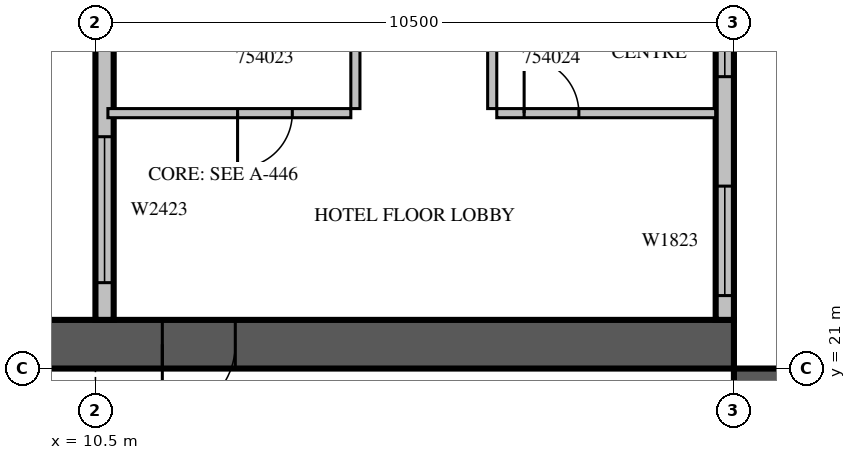
"""IFC4 building model, lengths in metres.
Left out: names, types, materials, properties, quantities, classifications, styles, units other than length and angle.
Written with IfcOpenShell. Run it as: python <this file> out.ifc"""

import sys

from ifc_helpers import new_model, si_unit, direction, frame, frame_2d, origin, place, context, subcontext, project, spatial, rectangle, extrude, source, transform, mapped, element, fill, save


model = new_model("IFC4")
c1 = context("Model", 3, precision=1e-05, world=origin(), true_north=direction((0.0, 1.0)))
c2 = subcontext(c1, "Body", "Model", "MODEL_VIEW")
j1 = project(units=[si_unit("LENGTHUNIT", "METRE"), si_unit("PLANEANGLEUNIT", "RADIAN")], contexts=[c1])
p1 = place(None, origin())
s1 = spatial("IfcSite", under=j1, at=p1, CompositionType="ELEMENT")
p2 = place(p1, origin())
s2 = spatial("IfcBuilding", under=s1, at=p2, CompositionType="ELEMENT")
p3 = place(p2, frame((0.0, 0.0, 238.6)))
s3 = spatial("IfcBuildingStorey", under=s2, at=p3, CompositionType="ELEMENT", Elevation=238.6)
m1 = source(origin(), c2, "Body", "SweptSolid", [
    extrude(rectangle(XDim=16.8, YDim=0.8, at=frame_2d((8.4, 0.0))), origin(), (0.0, 0.0, 1.0), 3.8),
])
p4 = place(p3, frame((21.4, 4.2, 0.0), z_axis=(0.0, 0.0, 1.0), x_axis=(0.0, 1.0, 0.0)))
e1 = element("IfcWall", 1, at=p4, inside=s3, PredefinedType="SHEAR", context=c2, shape_type="MappedRepresentation", body=[
    mapped(m1, transform((0.0, 0.0, 0.0), scale=1.0)),
])
m2 = source(origin(), c2, "Body", "SweptSolid", [
    extrude(rectangle(XDim=2.2, YDim=2.1, at=frame_2d((1.1, 1.05))), frame((0.0, 0.41, 0.0), z_axis=(0.0, -1.0, 0.0), x_axis=(1.0, 0.0, 0.0)), (0.0, 0.0, 1.0), 0.82),
])
p5 = place(p4, frame((4.2, 0.0, 0.0)))
e2 = element("IfcOpeningElement", 2, at=p5, cuts=e1, PredefinedType="OPENING", context=c2, shape_type="MappedRepresentation", body=[
    mapped(m2, transform((0.0, 0.0, 0.0), scale=1.0)),
])
m3 = source(origin(), c2, "Body", "SweptSolid", [
    extrude(rectangle(XDim=1.2, YDim=2.1, at=frame_2d((0.6, 1.05))), frame((0.0, 0.41, 0.0), z_axis=(0.0, -1.0, 0.0), x_axis=(1.0, 0.0, 0.0)), (0.0, 0.0, 1.0), 0.82),
])
p6 = place(p4, frame((14.7, 0.0, 0.0)))
e3 = element("IfcOpeningElement", 3, at=p6, cuts=e1, PredefinedType="OPENING", context=c2, shape_type="MappedRepresentation", body=[
    mapped(m3, transform((0.0, 0.0, 0.0), scale=1.0)),
])
p7 = place(p3, frame((4.2, 21.4, 0.0), z_axis=(0.0, 0.0, 1.0), x_axis=(1.0, 0.0, 0.0)))
e4 = element("IfcWall", 4, at=p7, inside=s3, PredefinedType="SHEAR", context=c2, shape_type="MappedRepresentation", body=[
    mapped(m1, transform((0.0, 0.0, 0.0), scale=1.0)),
])
p8 = place(p7, frame((7.4, 0.0, 0.0)))
e5 = element("IfcOpeningElement", 5, at=p8, cuts=e4, PredefinedType="OPENING", context=c2, shape_type="MappedRepresentation", body=[
    mapped(m3, transform((0.0, 0.0, 0.0), scale=1.0)),
])
m4 = source(origin(), c2, "Body", "SweptSolid", [
    extrude(rectangle(XDim=7.2, YDim=0.3, at=frame_2d((3.6, 0.0))), origin(), (0.0, 0.0, 1.0), 3.4),
])
p9 = place(p3, frame((20.85, 21.8, 0.0), z_axis=(0.0, 0.0, 1.0), x_axis=(0.0, 1.0, 0.0)))
e6 = element("IfcWall", 6, at=p9, inside=s3, PredefinedType="STANDARD", context=c2, shape_type="MappedRepresentation", body=[
    mapped(m4, transform((0.0, 0.0, 0.0), scale=1.0)),
])
m5 = source(origin(), c2, "Body", "SweptSolid", [
    extrude(rectangle(XDim=1.8, YDim=2.3, at=frame_2d((0.9, 1.15))), frame((0.0, 0.16, 0.0), z_axis=(0.0, -1.0, 0.0), x_axis=(1.0, 0.0, 0.0)), (0.0, 0.0, 1.0), 0.32),
])
p10 = place(p9, frame((0.4, 0.0, 0.6)))
e7 = element("IfcOpeningElement", 7, at=p10, cuts=e6, PredefinedType="OPENING", context=c2, shape_type="MappedRepresentation", body=[
    mapped(m5, transform((0.0, 0.0, 0.0), scale=1.0)),
])
m6 = source(origin(), c2, "Body", "SweptSolid", [
    extrude(rectangle(XDim=3.0, YDim=2.3, at=frame_2d((1.5, 1.15))), frame((0.0, 0.16, 0.0), z_axis=(0.0, -1.0, 0.0), x_axis=(1.0, 0.0, 0.0)), (0.0, 0.0, 1.0), 0.32),
])
p11 = place(p9, frame((4.0, 0.0, 0.6)))
e8 = element("IfcOpeningElement", 8, at=p11, cuts=e6, PredefinedType="OPENING", context=c2, shape_type="MappedRepresentation", body=[
    mapped(m6, transform((0.0, 0.0, 0.0), scale=1.0)),
])
p12 = place(p3, frame((10.65, 29.0, 0.0), z_axis=(0.0, 0.0, 1.0), x_axis=(0.0, -1.0, 0.0)))
e9 = element("IfcWall", 9, at=p12, inside=s3, PredefinedType="STANDARD", context=c2, shape_type="MappedRepresentation", body=[
    mapped(m4, transform((0.0, 0.0, 0.0), scale=1.0)),
])
p13 = place(p12, frame((0.2, 0.0, 0.6)))
e10 = element("IfcOpeningElement", 10, at=p13, cuts=e9, PredefinedType="OPENING", context=c2, shape_type="MappedRepresentation", body=[
    mapped(m5, transform((0.0, 0.0, 0.0), scale=1.0)),
])
m7 = source(origin(), c2, "Body", "SweptSolid", [
    extrude(rectangle(XDim=2.4, YDim=2.3, at=frame_2d((1.2, 1.15))), frame((0.0, 0.16, 0.0), z_axis=(0.0, -1.0, 0.0), x_axis=(1.0, 0.0, 0.0)), (0.0, 0.0, 1.0), 0.32),
])
p14 = place(p12, frame((4.188, 0.0, 0.6)))
e11 = element("IfcOpeningElement", 11, at=p14, cuts=e9, PredefinedType="OPENING", context=c2, shape_type="MappedRepresentation", body=[
    mapped(m7, transform((0.0, 0.0, 0.0), scale=1.0)),
])
m8 = source(origin(), c2, "Body", "SweptSolid", [
    extrude(rectangle(XDim=3.995, YDim=0.15, at=frame_2d((1.998, 0.0))), origin(), (0.0, 0.0, 1.0), 3.4),
])
p15 = place(p3, frame((10.705, 25.2, 0.0), z_axis=(0.0, 0.0, 1.0), x_axis=(1.0, 0.0, 0.0)))
e12 = element("IfcWall", 12, at=p15, inside=s3, PredefinedType="PARTITIONING", context=c2, shape_type="MappedRepresentation", body=[
    mapped(m8, transform((0.0, 0.0, 0.0), scale=1.0)),
])
m9 = source(origin(), c2, "Body", "SweptSolid", [
    extrude(rectangle(XDim=0.9, YDim=2.1, at=frame_2d((0.45, 1.05))), frame((0.0, 0.085, 0.0), z_axis=(0.0, -1.0, 0.0), x_axis=(1.0, 0.0, 0.0)), (0.0, 0.0, 1.0), 0.17),
])
p16 = place(p15, frame((2.132, 0.0, 0.0)))
e13 = element("IfcOpeningElement", 13, at=p16, cuts=e12, PredefinedType="OPENING", context=c2, shape_type="MappedRepresentation", body=[
    mapped(m9, transform((0.0, 0.0, 0.0), scale=1.0)),
])
m10 = source(origin(), c2, "Body", "SweptSolid", [
    extrude(rectangle(XDim=3.6, YDim=0.15, at=frame_2d((1.8, 0.0))), origin(), (0.0, 0.0, 1.0), 3.4),
])
p17 = place(p3, frame((17.1, 25.2, 0.0), z_axis=(0.0, 0.0, 1.0), x_axis=(1.0, 0.0, 0.0)))
e14 = element("IfcWall", 14, at=p17, inside=s3, PredefinedType="PARTITIONING", context=c2, shape_type="MappedRepresentation", body=[
    mapped(m10, transform((0.0, 0.0, 0.0), scale=1.0)),
])
p18 = place(p17, frame((0.45, 0.0, 0.0)))
e15 = element("IfcOpeningElement", 15, at=p18, cuts=e14, PredefinedType="OPENING", context=c2, shape_type="MappedRepresentation", body=[
    mapped(m9, transform((0.0, 0.0, 0.0), scale=1.0)),
])
m11 = source(origin(), c2, "Body", "SweptSolid", [
    extrude(rectangle(XDim=4.05, YDim=0.15, at=frame_2d((2.025, 0.0))), origin(), (0.0, 0.0, 1.0), 3.4),
])
for number, where, z_axis, x_axis in (
    (16, (14.775, 25.275, 0.0), (0.0, 0.0, 1.0), (0.0, 1.0, 0.0)),
    (17, (17.025, 29.325, 0.0), (0.0, 0.0, 1.0), (0.0, -1.0, 0.0)),
):
    element("IfcWall", number, at=place(p3, frame(where, z_axis=z_axis, x_axis=x_axis)), inside=s3, PredefinedType="PARTITIONING", context=c2, shape_type="MappedRepresentation", body=[
        mapped(m11, transform((0.0, 0.0, 0.0), scale=1.0)),
    ])
m12 = source(origin(), c2, "Body", "SweptSolid", [
    extrude(rectangle(XDim=1.8, YDim=2.3, at=frame_2d((0.9, 1.15))), frame((0.0, 0.03, 0.0), z_axis=(0.0, -1.0, 0.0), x_axis=(1.0, 0.0, 0.0)), (0.0, 0.0, 1.0), 0.06),
])
p19 = place(p10, origin())
e18 = element("IfcWindow", 18, at=p19, inside=s3, PartitioningType="SINGLE_PANEL", PredefinedType="WINDOW", context=c2, shape_type="MappedRepresentation", body=[
    mapped(m12, transform((0.0, 0.0, 0.0), scale=1.0)),
])
fill(e7, e18)
m13 = source(origin(), c2, "Body", "SweptSolid", [
    extrude(rectangle(XDim=3.0, YDim=2.3, at=frame_2d((1.5, 1.15))), frame((0.0, 0.03, 0.0), z_axis=(0.0, -1.0, 0.0), x_axis=(1.0, 0.0, 0.0)), (0.0, 0.0, 1.0), 0.06),
])
p20 = place(p11, origin())
e19 = element("IfcWindow", 19, at=p20, inside=s3, PartitioningType="SINGLE_PANEL", PredefinedType="WINDOW", context=c2, shape_type="MappedRepresentation", body=[
    mapped(m13, transform((0.0, 0.0, 0.0), scale=1.0)),
])
fill(e8, e19)
m14 = source(origin(), c2, "Body", "SweptSolid", [
    extrude(rectangle(XDim=2.4, YDim=2.3, at=frame_2d((1.2, 1.15))), frame((0.0, 0.03, 0.0), z_axis=(0.0, -1.0, 0.0), x_axis=(1.0, 0.0, 0.0)), (0.0, 0.0, 1.0), 0.06),
])
p21 = place(p14, origin())
e20 = element("IfcWindow", 20, at=p21, inside=s3, PartitioningType="SINGLE_PANEL", PredefinedType="WINDOW", context=c2, shape_type="MappedRepresentation", body=[
    mapped(m14, transform((0.0, 0.0, 0.0), scale=1.0)),
])
fill(e11, e20)
m15 = source(origin(), c2, "Body", "SweptSolid", [
    extrude(rectangle(XDim=1.2, YDim=2.1, at=frame_2d((0.6, 1.05))), frame((0.0, 0.025, 0.0), z_axis=(0.0, -1.0, 0.0), x_axis=(1.0, 0.0, 0.0)), (0.0, 0.0, 1.0), 0.05),
])
p22 = place(p8, origin())
e21 = element("IfcDoor", 21, at=p22, inside=s3, OperationType="SINGLE_SWING_RIGHT", PredefinedType="DOOR", context=c2, shape_type="MappedRepresentation", body=[
    mapped(m15, transform((0.0, 0.0, 0.0), scale=1.0)),
])
fill(e5, e21)
m16 = source(origin(), c2, "Body", "SweptSolid", [
    extrude(rectangle(XDim=0.9, YDim=2.1, at=frame_2d((0.45, 1.05))), frame((0.0, 0.025, 0.0), z_axis=(0.0, -1.0, 0.0), x_axis=(1.0, 0.0, 0.0)), (0.0, 0.0, 1.0), 0.05),
])
p23 = place(p16, origin())
e22 = element("IfcDoor", 22, at=p23, inside=s3, OperationType="SINGLE_SWING_RIGHT", PredefinedType="DOOR", context=c2, shape_type="MappedRepresentation", body=[
    mapped(m16, transform((0.0, 0.0, 0.0), scale=1.0)),
])
fill(e13, e22)
p24 = place(p18, origin())
e23 = element("IfcDoor", 23, at=p24, inside=s3, OperationType="SINGLE_SWING_LEFT", PredefinedType="DOOR", context=c2, shape_type="MappedRepresentation", body=[
    mapped(m16, transform((0.0, 0.0, 0.0), scale=1.0)),
])
fill(e15, e23)
save(model, sys.argv[1])
